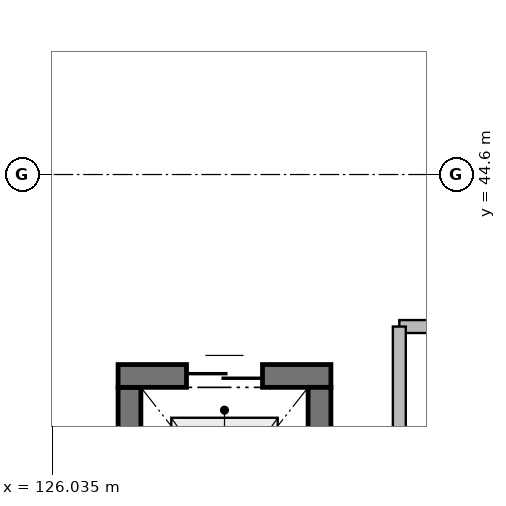
"""IFC4 building model, lengths in metres.
Left out: names, types, materials, properties, quantities, classifications, styles, units other than length and angle.
Written with IfcOpenShell. Run it as: python <this file> out.ifc"""

import sys

from ifc_helpers import new_model, si_unit, direction, frame, frame_2d, origin, place, context, subcontext, project, spatial, rectangle, extrude, element, fill, save


model = new_model("IFC4")
c1 = context("Model", 3, precision=1e-05, world=origin(), true_north=direction((0.0, 1.0)))
c2 = subcontext(c1, "Body", "Model", "MODEL_VIEW")
j1 = project(units=[si_unit("LENGTHUNIT", "METRE"), si_unit("PLANEANGLEUNIT", "RADIAN")], contexts=[c1])
p1 = place(None, origin())
s1 = spatial("IfcSite", under=j1, at=p1, CompositionType="ELEMENT")
p2 = place(p1, origin())
s2 = spatial("IfcBuilding", under=s1, at=p2, CompositionType="ELEMENT")
p3 = place(p2, frame((0.0, 0.0, 4.8)))
s3 = spatial("IfcBuildingStorey", under=s2, at=p3, CompositionType="ELEMENT", Elevation=4.8)
p4 = place(p3, frame((127.05, 39.0, 0.0), z_axis=(0.0, 0.0, 1.0), x_axis=(0.0, 1.0, 0.0)))
e1 = element("IfcWall", 1, at=p4, inside=s3, PredefinedType="SOLIDWALL", context=c2, shape_type="SweptSolid", body=[
    extrude(rectangle(XDim=2.8, YDim=0.3, at=frame_2d((1.4, 0.0))), origin(), (0.0, 0.0, 1.0), 4.2),
])
p5 = place(p3, frame((126.9, 41.95, 0.0), z_axis=(0.0, 0.0, 1.0), x_axis=(1.0, 0.0, 0.0)))
e2 = element("IfcWall", 2, at=p5, inside=s3, PredefinedType="SOLIDWALL", context=c2, shape_type="SweptSolid", body=[
    extrude(rectangle(XDim=2.8, YDim=0.3, at=frame_2d((1.4, 0.0))), origin(), (0.0, 0.0, 1.0), 4.2),
])
p6 = place(p5, frame((0.9, 0.0, 0.0)))
e3 = element("IfcOpeningElement", 3, at=p6, cuts=e2, PredefinedType="OPENING", context=c2, shape_type="SweptSolid", body=[
    extrude(rectangle(XDim=1.0, YDim=2.15, at=frame_2d((0.5, 1.075))), frame((0.0, 0.17, 0.0), z_axis=(0.0, -1.0, 0.0), x_axis=(1.0, 0.0, 0.0)), (0.0, 0.0, 1.0), 0.34),
])
p7 = place(p3, frame((129.55, 41.8, 0.0), z_axis=(0.0, 0.0, 1.0), x_axis=(0.0, -1.0, 0.0)))
e4 = element("IfcWall", 4, at=p7, inside=s3, PredefinedType="SOLIDWALL", context=c2, shape_type="SweptSolid", body=[
    extrude(rectangle(XDim=2.8, YDim=0.3, at=frame_2d((1.4, 0.0))), origin(), (0.0, 0.0, 1.0), 4.2),
])
p8 = place(p3, frame((130.6, 42.6, 0.0), z_axis=(0.0, 0.0, 1.0), x_axis=(1.0, 0.0, 0.0)))
e5 = element("IfcWall", 5, at=p8, inside=s3, PredefinedType="PARTITIONING", context=c2, shape_type="SweptSolid", body=[
    extrude(rectangle(XDim=14.4, YDim=0.17, at=frame_2d((7.2, 0.0))), origin(), (0.0, 0.0, 1.0), 3.94),
])
p9 = place(p8, frame((6.549, 0.0, 0.0)))
e6 = element("IfcOpeningElement", 6, at=p9, cuts=e5, PredefinedType="OPENING", context=c2, shape_type="SweptSolid", body=[
    extrude(rectangle(XDim=1.55, YDim=2.2, at=frame_2d((0.775, 1.1))), frame((0.0, 0.105, 0.0), z_axis=(0.0, -1.0, 0.0), x_axis=(1.0, 0.0, 0.0)), (0.0, 0.0, 1.0), 0.21),
])
p10 = place(p3, frame((130.6, 24.0, 0.0), z_axis=(0.0, 0.0, 1.0), x_axis=(0.0, 1.0, 0.0)))
e7 = element("IfcWall", 7, at=p10, inside=s3, PredefinedType="PARTITIONING", context=c2, shape_type="SweptSolid", body=[
    extrude(rectangle(XDim=18.6, YDim=0.17, at=frame_2d((9.3, 0.0))), origin(), (0.0, 0.0, 1.0), 3.94),
])
p11 = place(p6, origin())
e8 = element("IfcDoor", 8, at=p11, inside=s3, OperationType="DOUBLE_DOOR_SLIDING", PredefinedType="DOOR", context=c2, shape_type="SweptSolid", body=[
    extrude(rectangle(XDim=1.0, YDim=2.15, at=frame_2d((0.5, 1.075))), frame((0.0, 0.025, 0.0), z_axis=(0.0, -1.0, 0.0), x_axis=(1.0, 0.0, 0.0)), (0.0, 0.0, 1.0), 0.05),
])
fill(e3, e8)
save(model, sys.argv[1])
